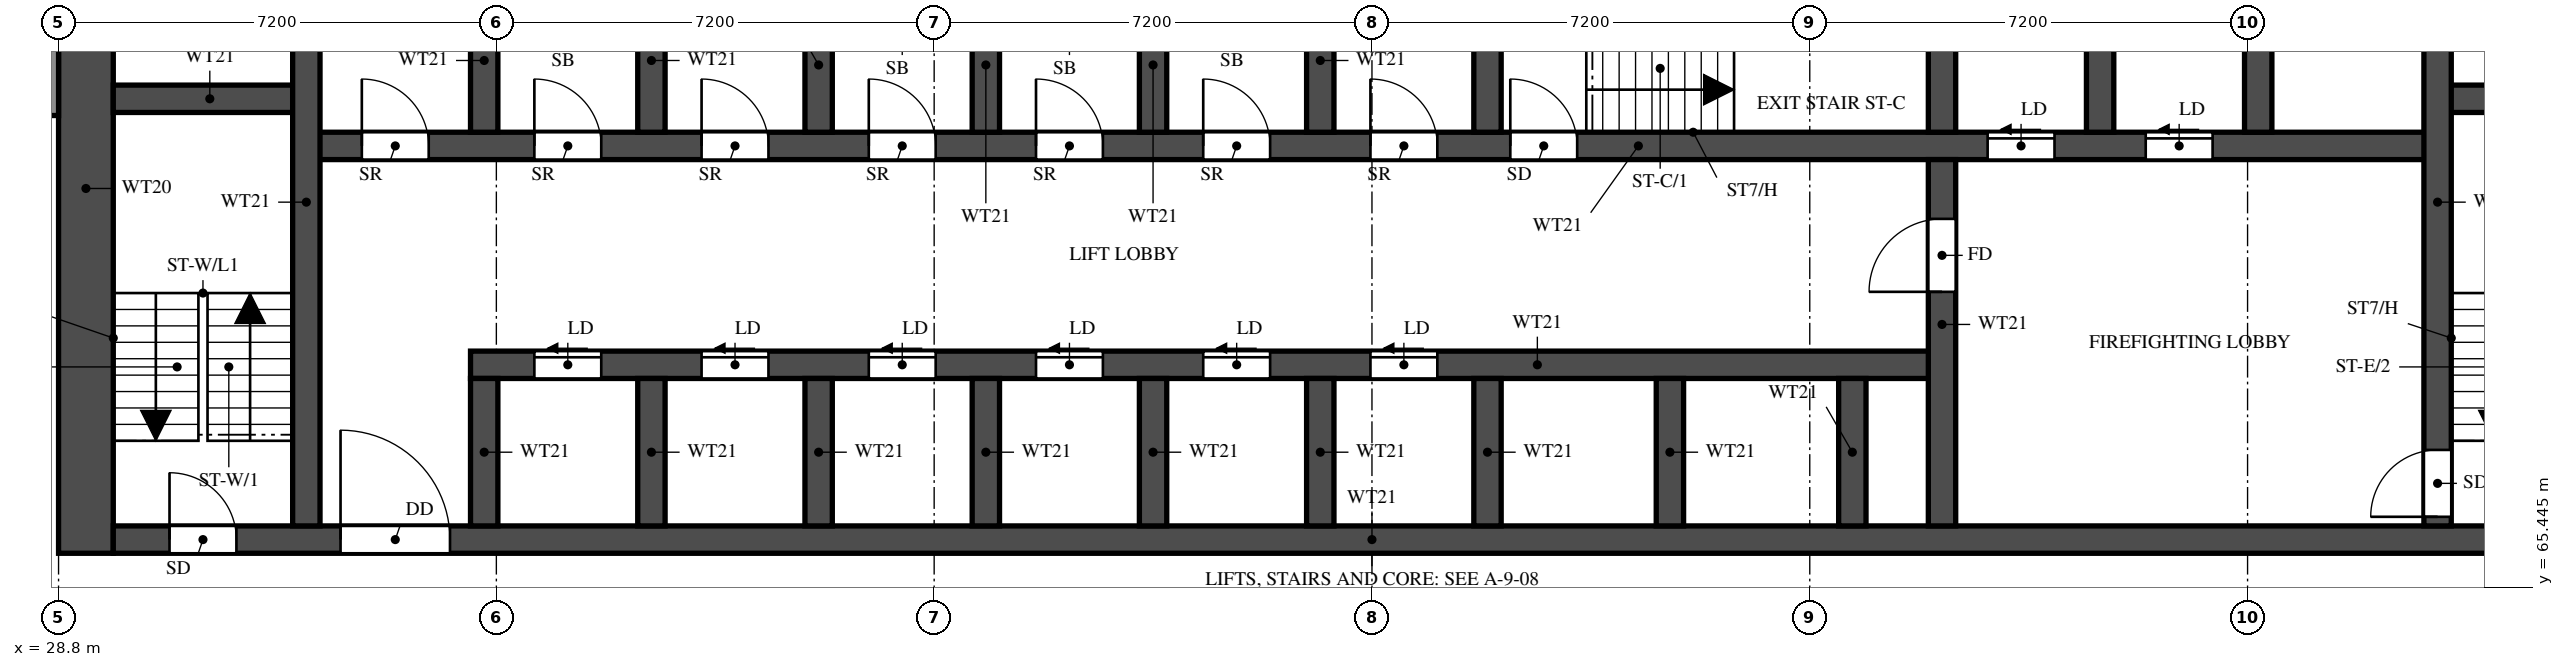
"""IFC4 building model, lengths in metres.
Left out: names, types, materials, properties, quantities, classifications, styles, units other than length and angle.
Written with IfcOpenShell. Run it as: python <this file> out.ifc"""

import sys

from ifc_helpers import new_model, si_unit, direction, frame, frame_2d, origin, place, context, subcontext, project, spatial, rectangle, extrude, element, fill, save


model = new_model("IFC4")
c1 = context("Model", 3, precision=1e-05, world=origin(), true_north=direction((0.0, 1.0)))
c2 = subcontext(c1, "Body", "Model", "MODEL_VIEW")
j1 = project(units=[si_unit("LENGTHUNIT", "METRE"), si_unit("PLANEANGLEUNIT", "RADIAN")], contexts=[c1])
p1 = place(None, origin())
s1 = spatial("IfcSite", under=j1, at=p1, CompositionType="ELEMENT")
p2 = place(p1, origin())
s2 = spatial("IfcBuilding", under=s1, at=p2, CompositionType="ELEMENT")
p3 = place(p2, frame((0.0, 0.0, 34.0)))
s3 = spatial("IfcBuildingStorey", under=s2, at=p3, CompositionType="ELEMENT", Elevation=34.0)
p4 = place(p3, frame((29.25, 66.0, 0.0), z_axis=(0.0, 0.0, 1.0), x_axis=(0.0, 1.0, 0.0)))
e1 = element("IfcWall", 1, at=p4, inside=s3, PredefinedType="SHEAR", context=c2, shape_type="SweptSolid", body=[
    extrude(rectangle(XDim=12.0, YDim=0.9, at=frame_2d((6.0, 0.0))), origin(), (0.0, 0.0, 1.0), 3.18),
])
p5 = place(p3, frame((29.7, 66.225, 0.0), z_axis=(0.0, 0.0, 1.0), x_axis=(1.0, 0.0, 0.0)))
e2 = element("IfcWall", 2, at=p5, inside=s3, PredefinedType="SHEAR", context=c2, shape_type="SweptSolid", body=[
    extrude(rectangle(XDim=41.4, YDim=0.45, at=frame_2d((20.7, 0.0))), origin(), (0.0, 0.0, 1.0), 3.18),
])
p6 = place(p5, frame((0.925, 0.0, 0.0)))
e3 = element("IfcOpeningElement", 3, at=p6, cuts=e2, PredefinedType="OPENING", context=c2, shape_type="SweptSolid", body=[
    extrude(rectangle(XDim=1.1, YDim=2.1, at=frame_2d((0.55, 1.05))), frame((0.0, 0.235, 0.0), z_axis=(0.0, -1.0, 0.0), x_axis=(1.0, 0.0, 0.0)), (0.0, 0.0, 1.0), 0.47),
])
p7 = place(p5, frame((3.738, 0.0, 0.0)))
e4 = element("IfcOpeningElement", 4, at=p7, cuts=e2, PredefinedType="OPENING", context=c2, shape_type="SweptSolid", body=[
    extrude(rectangle(XDim=1.8, YDim=2.1, at=frame_2d((0.9, 1.05))), frame((0.0, 0.235, 0.0), z_axis=(0.0, -1.0, 0.0), x_axis=(1.0, 0.0, 0.0)), (0.0, 0.0, 1.0), 0.47),
])
p8 = place(p3, frame((35.575, 69.1, 0.0), z_axis=(0.0, 0.0, 1.0), x_axis=(1.0, 0.0, 0.0)))
e5 = element("IfcWall", 5, at=p8, inside=s3, PredefinedType="SHEAR", context=c2, shape_type="SweptSolid", body=[
    extrude(rectangle(XDim=24.2, YDim=0.45, at=frame_2d((12.1, 0.0))), origin(), (0.0, 0.0, 1.0), 3.18),
])
p9 = place(p8, frame((1.05, 0.0, 0.0)))
e6 = element("IfcOpeningElement", 6, at=p9, cuts=e5, PredefinedType="OPENING", context=c2, shape_type="SweptSolid", body=[
    extrude(rectangle(XDim=1.1, YDim=2.1, at=frame_2d((0.55, 1.05))), frame((0.0, 0.235, 0.0), z_axis=(0.0, -1.0, 0.0), x_axis=(1.0, 0.0, 0.0)), (0.0, 0.0, 1.0), 0.47),
])
p10 = place(p8, frame((3.8, 0.0, 0.0)))
e7 = element("IfcOpeningElement", 7, at=p10, cuts=e5, PredefinedType="OPENING", context=c2, shape_type="SweptSolid", body=[
    extrude(rectangle(XDim=1.1, YDim=2.1, at=frame_2d((0.55, 1.05))), frame((0.0, 0.235, 0.0), z_axis=(0.0, -1.0, 0.0), x_axis=(1.0, 0.0, 0.0)), (0.0, 0.0, 1.0), 0.47),
])
p11 = place(p8, frame((6.55, 0.0, 0.0)))
e8 = element("IfcOpeningElement", 8, at=p11, cuts=e5, PredefinedType="OPENING", context=c2, shape_type="SweptSolid", body=[
    extrude(rectangle(XDim=1.1, YDim=2.1, at=frame_2d((0.55, 1.05))), frame((0.0, 0.235, 0.0), z_axis=(0.0, -1.0, 0.0), x_axis=(1.0, 0.0, 0.0)), (0.0, 0.0, 1.0), 0.47),
])
p12 = place(p8, frame((9.3, 0.0, 0.0)))
e9 = element("IfcOpeningElement", 9, at=p12, cuts=e5, PredefinedType="OPENING", context=c2, shape_type="SweptSolid", body=[
    extrude(rectangle(XDim=1.1, YDim=2.1, at=frame_2d((0.55, 1.05))), frame((0.0, 0.235, 0.0), z_axis=(0.0, -1.0, 0.0), x_axis=(1.0, 0.0, 0.0)), (0.0, 0.0, 1.0), 0.47),
])
p13 = place(p8, frame((12.05, 0.0, 0.0)))
e10 = element("IfcOpeningElement", 10, at=p13, cuts=e5, PredefinedType="OPENING", context=c2, shape_type="SweptSolid", body=[
    extrude(rectangle(XDim=1.1, YDim=2.1, at=frame_2d((0.55, 1.05))), frame((0.0, 0.235, 0.0), z_axis=(0.0, -1.0, 0.0), x_axis=(1.0, 0.0, 0.0)), (0.0, 0.0, 1.0), 0.47),
])
p14 = place(p8, frame((14.8, 0.0, 0.0)))
e11 = element("IfcOpeningElement", 11, at=p14, cuts=e5, PredefinedType="OPENING", context=c2, shape_type="SweptSolid", body=[
    extrude(rectangle(XDim=1.1, YDim=2.1, at=frame_2d((0.55, 1.05))), frame((0.0, 0.235, 0.0), z_axis=(0.0, -1.0, 0.0), x_axis=(1.0, 0.0, 0.0)), (0.0, 0.0, 1.0), 0.47),
])
p15 = place(p3, frame((32.875, 72.7, 0.0), z_axis=(0.0, 0.0, 1.0), x_axis=(1.0, 0.0, 0.0)))
e12 = element("IfcWall", 12, at=p15, inside=s3, PredefinedType="SHEAR", context=c2, shape_type="SweptSolid", body=[
    extrude(rectangle(XDim=35.05, YDim=0.45, at=frame_2d((17.525, 0.0))), origin(), (0.0, 0.0, 1.0), 3.18),
])
p16 = place(p15, frame((19.8, 0.0, 0.0)))
e13 = element("IfcOpeningElement", 13, at=p16, cuts=e12, PredefinedType="OPENING", context=c2, shape_type="SweptSolid", body=[
    extrude(rectangle(XDim=1.1, YDim=2.1, at=frame_2d((0.55, 1.05))), frame((0.0, 0.235, 0.0), z_axis=(0.0, -1.0, 0.0), x_axis=(1.0, 0.0, 0.0)), (0.0, 0.0, 1.0), 0.47),
])
p17 = place(p15, frame((27.65, 0.0, 0.0)))
e14 = element("IfcOpeningElement", 14, at=p17, cuts=e12, PredefinedType="OPENING", context=c2, shape_type="SweptSolid", body=[
    extrude(rectangle(XDim=1.1, YDim=2.1, at=frame_2d((0.55, 1.05))), frame((0.0, 0.235, 0.0), z_axis=(0.0, -1.0, 0.0), x_axis=(1.0, 0.0, 0.0)), (0.0, 0.0, 1.0), 0.47),
])
p18 = place(p15, frame((30.25, 0.0, 0.0)))
e15 = element("IfcOpeningElement", 15, at=p18, cuts=e12, PredefinedType="OPENING", context=c2, shape_type="SweptSolid", body=[
    extrude(rectangle(XDim=1.1, YDim=2.1, at=frame_2d((0.55, 1.05))), frame((0.0, 0.235, 0.0), z_axis=(0.0, -1.0, 0.0), x_axis=(1.0, 0.0, 0.0)), (0.0, 0.0, 1.0), 0.47),
])
p19 = place(p15, frame((3.75, 0.0, 0.0)))
e16 = element("IfcOpeningElement", 16, at=p19, cuts=e12, PredefinedType="OPENING", context=c2, shape_type="SweptSolid", body=[
    extrude(rectangle(XDim=1.1, YDim=2.1, at=frame_2d((0.55, 1.05))), frame((0.0, 0.235, 0.0), z_axis=(0.0, -1.0, 0.0), x_axis=(1.0, 0.0, 0.0)), (0.0, 0.0, 1.0), 0.47),
])
p20 = place(p15, frame((6.5, 0.0, 0.0)))
e17 = element("IfcOpeningElement", 17, at=p20, cuts=e12, PredefinedType="OPENING", context=c2, shape_type="SweptSolid", body=[
    extrude(rectangle(XDim=1.1, YDim=2.1, at=frame_2d((0.55, 1.05))), frame((0.0, 0.235, 0.0), z_axis=(0.0, -1.0, 0.0), x_axis=(1.0, 0.0, 0.0)), (0.0, 0.0, 1.0), 0.47),
])
p21 = place(p15, frame((9.25, 0.0, 0.0)))
e18 = element("IfcOpeningElement", 18, at=p21, cuts=e12, PredefinedType="OPENING", context=c2, shape_type="SweptSolid", body=[
    extrude(rectangle(XDim=1.1, YDim=2.1, at=frame_2d((0.55, 1.05))), frame((0.0, 0.235, 0.0), z_axis=(0.0, -1.0, 0.0), x_axis=(1.0, 0.0, 0.0)), (0.0, 0.0, 1.0), 0.47),
])
p22 = place(p15, frame((12.0, 0.0, 0.0)))
e19 = element("IfcOpeningElement", 19, at=p22, cuts=e12, PredefinedType="OPENING", context=c2, shape_type="SweptSolid", body=[
    extrude(rectangle(XDim=1.1, YDim=2.1, at=frame_2d((0.55, 1.05))), frame((0.0, 0.235, 0.0), z_axis=(0.0, -1.0, 0.0), x_axis=(1.0, 0.0, 0.0)), (0.0, 0.0, 1.0), 0.47),
])
p23 = place(p15, frame((14.75, 0.0, 0.0)))
e20 = element("IfcOpeningElement", 20, at=p23, cuts=e12, PredefinedType="OPENING", context=c2, shape_type="SweptSolid", body=[
    extrude(rectangle(XDim=1.1, YDim=2.1, at=frame_2d((0.55, 1.05))), frame((0.0, 0.235, 0.0), z_axis=(0.0, -1.0, 0.0), x_axis=(1.0, 0.0, 0.0)), (0.0, 0.0, 1.0), 0.47),
])
p24 = place(p15, frame((17.5, 0.0, 0.0)))
e21 = element("IfcOpeningElement", 21, at=p24, cuts=e12, PredefinedType="OPENING", context=c2, shape_type="SweptSolid", body=[
    extrude(rectangle(XDim=1.1, YDim=2.1, at=frame_2d((0.55, 1.05))), frame((0.0, 0.235, 0.0), z_axis=(0.0, -1.0, 0.0), x_axis=(1.0, 0.0, 0.0)), (0.0, 0.0, 1.0), 0.47),
])
p25 = place(p15, frame((0.913, 0.0, 0.0)))
e22 = element("IfcOpeningElement", 22, at=p25, cuts=e12, PredefinedType="OPENING", context=c2, shape_type="SweptSolid", body=[
    extrude(rectangle(XDim=1.1, YDim=2.1, at=frame_2d((0.55, 1.05))), frame((0.0, 0.235, 0.0), z_axis=(0.0, -1.0, 0.0), x_axis=(1.0, 0.0, 0.0)), (0.0, 0.0, 1.0), 0.47),
])
for number, where, z_axis, x_axis in (
    (23, (29.7, 73.475, 0.0), (0.0, 0.0, 1.0), (1.0, 0.0, 0.0)),
    (24, (67.925, 73.475, 0.0), (0.0, 0.0, 1.0), (1.0, 0.0, 0.0)),
):
    element("IfcWall", number, at=place(p3, frame(where, z_axis=z_axis, x_axis=x_axis)), inside=s3, PredefinedType="SHEAR", context=c2, shape_type="SweptSolid", body=[
        extrude(rectangle(XDim=3.175, YDim=0.45, at=frame_2d((1.587, 0.0))), origin(), (0.0, 0.0, 1.0), 3.18),
    ])
p26 = place(p3, frame((32.875, 66.45, 0.0), z_axis=(0.0, 0.0, 1.0), x_axis=(0.0, 1.0, 0.0)))
e25 = element("IfcWall", 25, at=p26, inside=s3, PredefinedType="SHEAR", context=c2, shape_type="SweptSolid", body=[
    extrude(rectangle(XDim=10.65, YDim=0.45, at=frame_2d((5.325, 0.0))), origin(), (0.0, 0.0, 1.0), 3.18),
])
p27 = place(p3, frame((67.925, 66.45, 0.0), z_axis=(0.0, 0.0, 1.0), x_axis=(0.0, 1.0, 0.0)))
e26 = element("IfcWall", 26, at=p27, inside=s3, PredefinedType="SHEAR", context=c2, shape_type="SweptSolid", body=[
    extrude(rectangle(XDim=10.65, YDim=0.45, at=frame_2d((5.325, 0.0))), origin(), (0.0, 0.0, 1.0), 3.18),
])
p28 = place(p27, frame((0.15, 0.0, 0.0)))
e27 = element("IfcOpeningElement", 27, at=p28, cuts=e26, PredefinedType="OPENING", context=c2, shape_type="SweptSolid", body=[
    extrude(rectangle(XDim=1.1, YDim=2.1, at=frame_2d((0.55, 1.05))), frame((0.0, 0.235, 0.0), z_axis=(0.0, -1.0, 0.0), x_axis=(1.0, 0.0, 0.0)), (0.0, 0.0, 1.0), 0.47),
])
p29 = place(p3, frame((59.775, 66.45, 0.0), z_axis=(0.0, 0.0, 1.0), x_axis=(0.0, 1.0, 0.0)))
e28 = element("IfcWall", 28, at=p29, inside=s3, PredefinedType="SHEAR", context=c2, shape_type="SweptSolid", body=[
    extrude(rectangle(XDim=6.025, YDim=0.45, at=frame_2d((3.013, 0.0))), origin(), (0.0, 0.0, 1.0), 3.18),
])
p30 = place(p29, frame((3.85, 0.0, 0.0)))
e29 = element("IfcOpeningElement", 29, at=p30, cuts=e28, PredefinedType="OPENING", context=c2, shape_type="SweptSolid", body=[
    extrude(rectangle(XDim=1.2, YDim=2.1, at=frame_2d((0.6, 1.05))), frame((0.0, 0.235, 0.0), z_axis=(0.0, -1.0, 0.0), x_axis=(1.0, 0.0, 0.0)), (0.0, 0.0, 1.0), 0.47),
])
p31 = place(p3, frame((59.775, 72.925, 0.0), z_axis=(0.0, 0.0, 1.0), x_axis=(0.0, 1.0, 0.0)))
e30 = element("IfcWall", 30, at=p31, inside=s3, PredefinedType="SHEAR", context=c2, shape_type="SweptSolid", body=[
    extrude(rectangle(XDim=2.95, YDim=0.45, at=frame_2d((1.475, 0.0))), origin(), (0.0, 0.0, 1.0), 3.18),
])
for number, where, z_axis, x_axis in (
    (31, (35.8, 66.45, 0.0), (0.0, 0.0, 1.0), (0.0, 1.0, 0.0)),
    (32, (38.55, 66.45, 0.0), (0.0, 0.0, 1.0), (0.0, 1.0, 0.0)),
    (33, (41.3, 66.45, 0.0), (0.0, 0.0, 1.0), (0.0, 1.0, 0.0)),
    (34, (44.05, 66.45, 0.0), (0.0, 0.0, 1.0), (0.0, 1.0, 0.0)),
    (35, (46.8, 66.45, 0.0), (0.0, 0.0, 1.0), (0.0, 1.0, 0.0)),
    (36, (49.55, 66.45, 0.0), (0.0, 0.0, 1.0), (0.0, 1.0, 0.0)),
    (37, (52.3, 66.45, 0.0), (0.0, 0.0, 1.0), (0.0, 1.0, 0.0)),
    (38, (55.3, 66.45, 0.0), (0.0, 0.0, 1.0), (0.0, 1.0, 0.0)),
    (39, (58.3, 66.45, 0.0), (0.0, 0.0, 1.0), (0.0, 1.0, 0.0)),
):
    element("IfcWall", number, at=place(p3, frame(where, z_axis=z_axis, x_axis=x_axis)), inside=s3, PredefinedType="SHEAR", context=c2, shape_type="SweptSolid", body=[
        extrude(rectangle(XDim=2.425, YDim=0.45, at=frame_2d((1.212, 0.0))), origin(), (0.0, 0.0, 1.0), 3.18),
    ])
for number, where, z_axis, x_axis in (
    (40, (35.8, 72.925, 0.0), (0.0, 0.0, 1.0), (0.0, 1.0, 0.0)),
    (41, (38.55, 72.925, 0.0), (0.0, 0.0, 1.0), (0.0, 1.0, 0.0)),
    (42, (41.3, 72.925, 0.0), (0.0, 0.0, 1.0), (0.0, 1.0, 0.0)),
    (43, (44.05, 72.925, 0.0), (0.0, 0.0, 1.0), (0.0, 1.0, 0.0)),
    (44, (46.8, 72.925, 0.0), (0.0, 0.0, 1.0), (0.0, 1.0, 0.0)),
    (45, (49.55, 72.925, 0.0), (0.0, 0.0, 1.0), (0.0, 1.0, 0.0)),
    (46, (52.3, 72.925, 0.0), (0.0, 0.0, 1.0), (0.0, 1.0, 0.0)),
    (47, (62.375, 72.925, 0.0), (0.0, 0.0, 1.0), (0.0, 1.0, 0.0)),
    (48, (64.975, 72.925, 0.0), (0.0, 0.0, 1.0), (0.0, 1.0, 0.0)),
):
    element("IfcWall", number, at=place(p3, frame(where, z_axis=z_axis, x_axis=x_axis)), inside=s3, PredefinedType="SHEAR", context=c2, shape_type="SweptSolid", body=[
        extrude(rectangle(XDim=2.95, YDim=0.45, at=frame_2d((1.475, 0.0))), origin(), (0.0, 0.0, 1.0), 3.18),
    ])
p32 = place(p3, frame((28.7, 73.2, 0.0), z_axis=(0.0, 0.0, 1.0), x_axis=(0.0, 1.0, 0.0)))
e49 = element("IfcWall", 49, at=p32, inside=s3, PredefinedType="SOLIDWALL", context=c2, shape_type="SweptSolid", body=[
    extrude(rectangle(XDim=4.8, YDim=0.2, at=frame_2d((2.4, 0.0))), origin(), (0.0, 0.0, 1.0), 3.18),
])
p33 = place(p6, origin())
e50 = element("IfcDoor", 50, at=p33, inside=s3, OperationType="SINGLE_SWING_LEFT", PredefinedType="DOOR", context=c2, shape_type="SweptSolid", body=[
    extrude(rectangle(XDim=1.1, YDim=2.1, at=frame_2d((0.55, 1.05))), frame((0.0, 0.025, 0.0), z_axis=(0.0, -1.0, 0.0), x_axis=(1.0, 0.0, 0.0)), (0.0, 0.0, 1.0), 0.05),
])
fill(e3, e50)
p34 = place(p16, origin())
e51 = element("IfcDoor", 51, at=p34, inside=s3, OperationType="SINGLE_SWING_LEFT", PredefinedType="DOOR", context=c2, shape_type="SweptSolid", body=[
    extrude(rectangle(XDim=1.1, YDim=2.1, at=frame_2d((0.55, 1.05))), frame((0.0, 0.025, 0.0), z_axis=(0.0, -1.0, 0.0), x_axis=(1.0, 0.0, 0.0)), (0.0, 0.0, 1.0), 0.05),
])
fill(e13, e51)
p35 = place(p28, origin())
e52 = element("IfcDoor", 52, at=p35, inside=s3, OperationType="SINGLE_SWING_LEFT", PredefinedType="DOOR", context=c2, shape_type="SweptSolid", body=[
    extrude(rectangle(XDim=1.1, YDim=2.1, at=frame_2d((0.55, 1.05))), frame((0.0, 0.025, 0.0), z_axis=(0.0, -1.0, 0.0), x_axis=(1.0, 0.0, 0.0)), (0.0, 0.0, 1.0), 0.05),
])
fill(e27, e52)
p36 = place(p7, origin())
e53 = element("IfcDoor", 53, at=p36, inside=s3, OperationType="DOUBLE_DOOR_SINGLE_SWING", PredefinedType="DOOR", context=c2, shape_type="SweptSolid", body=[
    extrude(rectangle(XDim=1.8, YDim=2.1, at=frame_2d((0.9, 1.05))), frame((0.0, 0.025, 0.0), z_axis=(0.0, -1.0, 0.0), x_axis=(1.0, 0.0, 0.0)), (0.0, 0.0, 1.0), 0.05),
])
fill(e4, e53)
p37 = place(p30, origin())
e54 = element("IfcDoor", 54, at=p37, inside=s3, OperationType="SINGLE_SWING_RIGHT", PredefinedType="DOOR", context=c2, shape_type="SweptSolid", body=[
    extrude(rectangle(XDim=1.2, YDim=2.1, at=frame_2d((0.6, 1.05))), frame((0.0, 0.025, 0.0), z_axis=(0.0, -1.0, 0.0), x_axis=(1.0, 0.0, 0.0)), (0.0, 0.0, 1.0), 0.05),
])
fill(e29, e54)
p38 = place(p17, origin())
e55 = element("IfcDoor", 55, at=p38, inside=s3, OperationType="SLIDING_TO_LEFT", PredefinedType="DOOR", context=c2, shape_type="SweptSolid", body=[
    extrude(rectangle(XDim=1.1, YDim=2.1, at=frame_2d((0.55, 1.05))), frame((0.0, 0.025, 0.0), z_axis=(0.0, -1.0, 0.0), x_axis=(1.0, 0.0, 0.0)), (0.0, 0.0, 1.0), 0.05),
])
fill(e14, e55)
p39 = place(p18, origin())
e56 = element("IfcDoor", 56, at=p39, inside=s3, OperationType="SLIDING_TO_LEFT", PredefinedType="DOOR", context=c2, shape_type="SweptSolid", body=[
    extrude(rectangle(XDim=1.1, YDim=2.1, at=frame_2d((0.55, 1.05))), frame((0.0, 0.025, 0.0), z_axis=(0.0, -1.0, 0.0), x_axis=(1.0, 0.0, 0.0)), (0.0, 0.0, 1.0), 0.05),
])
fill(e15, e56)
p40 = place(p9, origin())
e57 = element("IfcDoor", 57, at=p40, inside=s3, OperationType="SLIDING_TO_LEFT", PredefinedType="DOOR", context=c2, shape_type="SweptSolid", body=[
    extrude(rectangle(XDim=1.1, YDim=2.1, at=frame_2d((0.55, 1.05))), frame((0.0, 0.025, 0.0), z_axis=(0.0, -1.0, 0.0), x_axis=(1.0, 0.0, 0.0)), (0.0, 0.0, 1.0), 0.05),
])
fill(e6, e57)
p41 = place(p10, origin())
e58 = element("IfcDoor", 58, at=p41, inside=s3, OperationType="SLIDING_TO_LEFT", PredefinedType="DOOR", context=c2, shape_type="SweptSolid", body=[
    extrude(rectangle(XDim=1.1, YDim=2.1, at=frame_2d((0.55, 1.05))), frame((0.0, 0.025, 0.0), z_axis=(0.0, -1.0, 0.0), x_axis=(1.0, 0.0, 0.0)), (0.0, 0.0, 1.0), 0.05),
])
fill(e7, e58)
p42 = place(p11, origin())
e59 = element("IfcDoor", 59, at=p42, inside=s3, OperationType="SLIDING_TO_LEFT", PredefinedType="DOOR", context=c2, shape_type="SweptSolid", body=[
    extrude(rectangle(XDim=1.1, YDim=2.1, at=frame_2d((0.55, 1.05))), frame((0.0, 0.025, 0.0), z_axis=(0.0, -1.0, 0.0), x_axis=(1.0, 0.0, 0.0)), (0.0, 0.0, 1.0), 0.05),
])
fill(e8, e59)
p43 = place(p12, origin())
e60 = element("IfcDoor", 60, at=p43, inside=s3, OperationType="SLIDING_TO_LEFT", PredefinedType="DOOR", context=c2, shape_type="SweptSolid", body=[
    extrude(rectangle(XDim=1.1, YDim=2.1, at=frame_2d((0.55, 1.05))), frame((0.0, 0.025, 0.0), z_axis=(0.0, -1.0, 0.0), x_axis=(1.0, 0.0, 0.0)), (0.0, 0.0, 1.0), 0.05),
])
fill(e9, e60)
p44 = place(p13, origin())
e61 = element("IfcDoor", 61, at=p44, inside=s3, OperationType="SLIDING_TO_LEFT", PredefinedType="DOOR", context=c2, shape_type="SweptSolid", body=[
    extrude(rectangle(XDim=1.1, YDim=2.1, at=frame_2d((0.55, 1.05))), frame((0.0, 0.025, 0.0), z_axis=(0.0, -1.0, 0.0), x_axis=(1.0, 0.0, 0.0)), (0.0, 0.0, 1.0), 0.05),
])
fill(e10, e61)
p45 = place(p14, origin())
e62 = element("IfcDoor", 62, at=p45, inside=s3, OperationType="SLIDING_TO_LEFT", PredefinedType="DOOR", context=c2, shape_type="SweptSolid", body=[
    extrude(rectangle(XDim=1.1, YDim=2.1, at=frame_2d((0.55, 1.05))), frame((0.0, 0.025, 0.0), z_axis=(0.0, -1.0, 0.0), x_axis=(1.0, 0.0, 0.0)), (0.0, 0.0, 1.0), 0.05),
])
fill(e11, e62)
p46 = place(p19, origin())
e63 = element("IfcDoor", 63, at=p46, inside=s3, OperationType="SINGLE_SWING_LEFT", PredefinedType="DOOR", context=c2, shape_type="SweptSolid", body=[
    extrude(rectangle(XDim=1.1, YDim=2.1, at=frame_2d((0.55, 1.05))), frame((0.0, 0.025, 0.0), z_axis=(0.0, -1.0, 0.0), x_axis=(1.0, 0.0, 0.0)), (0.0, 0.0, 1.0), 0.05),
])
fill(e16, e63)
p47 = place(p20, origin())
e64 = element("IfcDoor", 64, at=p47, inside=s3, OperationType="SINGLE_SWING_LEFT", PredefinedType="DOOR", context=c2, shape_type="SweptSolid", body=[
    extrude(rectangle(XDim=1.1, YDim=2.1, at=frame_2d((0.55, 1.05))), frame((0.0, 0.025, 0.0), z_axis=(0.0, -1.0, 0.0), x_axis=(1.0, 0.0, 0.0)), (0.0, 0.0, 1.0), 0.05),
])
fill(e17, e64)
p48 = place(p21, origin())
e65 = element("IfcDoor", 65, at=p48, inside=s3, OperationType="SINGLE_SWING_LEFT", PredefinedType="DOOR", context=c2, shape_type="SweptSolid", body=[
    extrude(rectangle(XDim=1.1, YDim=2.1, at=frame_2d((0.55, 1.05))), frame((0.0, 0.025, 0.0), z_axis=(0.0, -1.0, 0.0), x_axis=(1.0, 0.0, 0.0)), (0.0, 0.0, 1.0), 0.05),
])
fill(e18, e65)
p49 = place(p22, origin())
e66 = element("IfcDoor", 66, at=p49, inside=s3, OperationType="SINGLE_SWING_LEFT", PredefinedType="DOOR", context=c2, shape_type="SweptSolid", body=[
    extrude(rectangle(XDim=1.1, YDim=2.1, at=frame_2d((0.55, 1.05))), frame((0.0, 0.025, 0.0), z_axis=(0.0, -1.0, 0.0), x_axis=(1.0, 0.0, 0.0)), (0.0, 0.0, 1.0), 0.05),
])
fill(e19, e66)
p50 = place(p23, origin())
e67 = element("IfcDoor", 67, at=p50, inside=s3, OperationType="SINGLE_SWING_LEFT", PredefinedType="DOOR", context=c2, shape_type="SweptSolid", body=[
    extrude(rectangle(XDim=1.1, YDim=2.1, at=frame_2d((0.55, 1.05))), frame((0.0, 0.025, 0.0), z_axis=(0.0, -1.0, 0.0), x_axis=(1.0, 0.0, 0.0)), (0.0, 0.0, 1.0), 0.05),
])
fill(e20, e67)
p51 = place(p24, origin())
e68 = element("IfcDoor", 68, at=p51, inside=s3, OperationType="SINGLE_SWING_LEFT", PredefinedType="DOOR", context=c2, shape_type="SweptSolid", body=[
    extrude(rectangle(XDim=1.1, YDim=2.1, at=frame_2d((0.55, 1.05))), frame((0.0, 0.025, 0.0), z_axis=(0.0, -1.0, 0.0), x_axis=(1.0, 0.0, 0.0)), (0.0, 0.0, 1.0), 0.05),
])
fill(e21, e68)
p52 = place(p25, origin())
e69 = element("IfcDoor", 69, at=p52, inside=s3, OperationType="SINGLE_SWING_LEFT", PredefinedType="DOOR", context=c2, shape_type="SweptSolid", body=[
    extrude(rectangle(XDim=1.1, YDim=2.1, at=frame_2d((0.55, 1.05))), frame((0.0, 0.025, 0.0), z_axis=(0.0, -1.0, 0.0), x_axis=(1.0, 0.0, 0.0)), (0.0, 0.0, 1.0), 0.05),
])
fill(e22, e69)
save(model, sys.argv[1])
